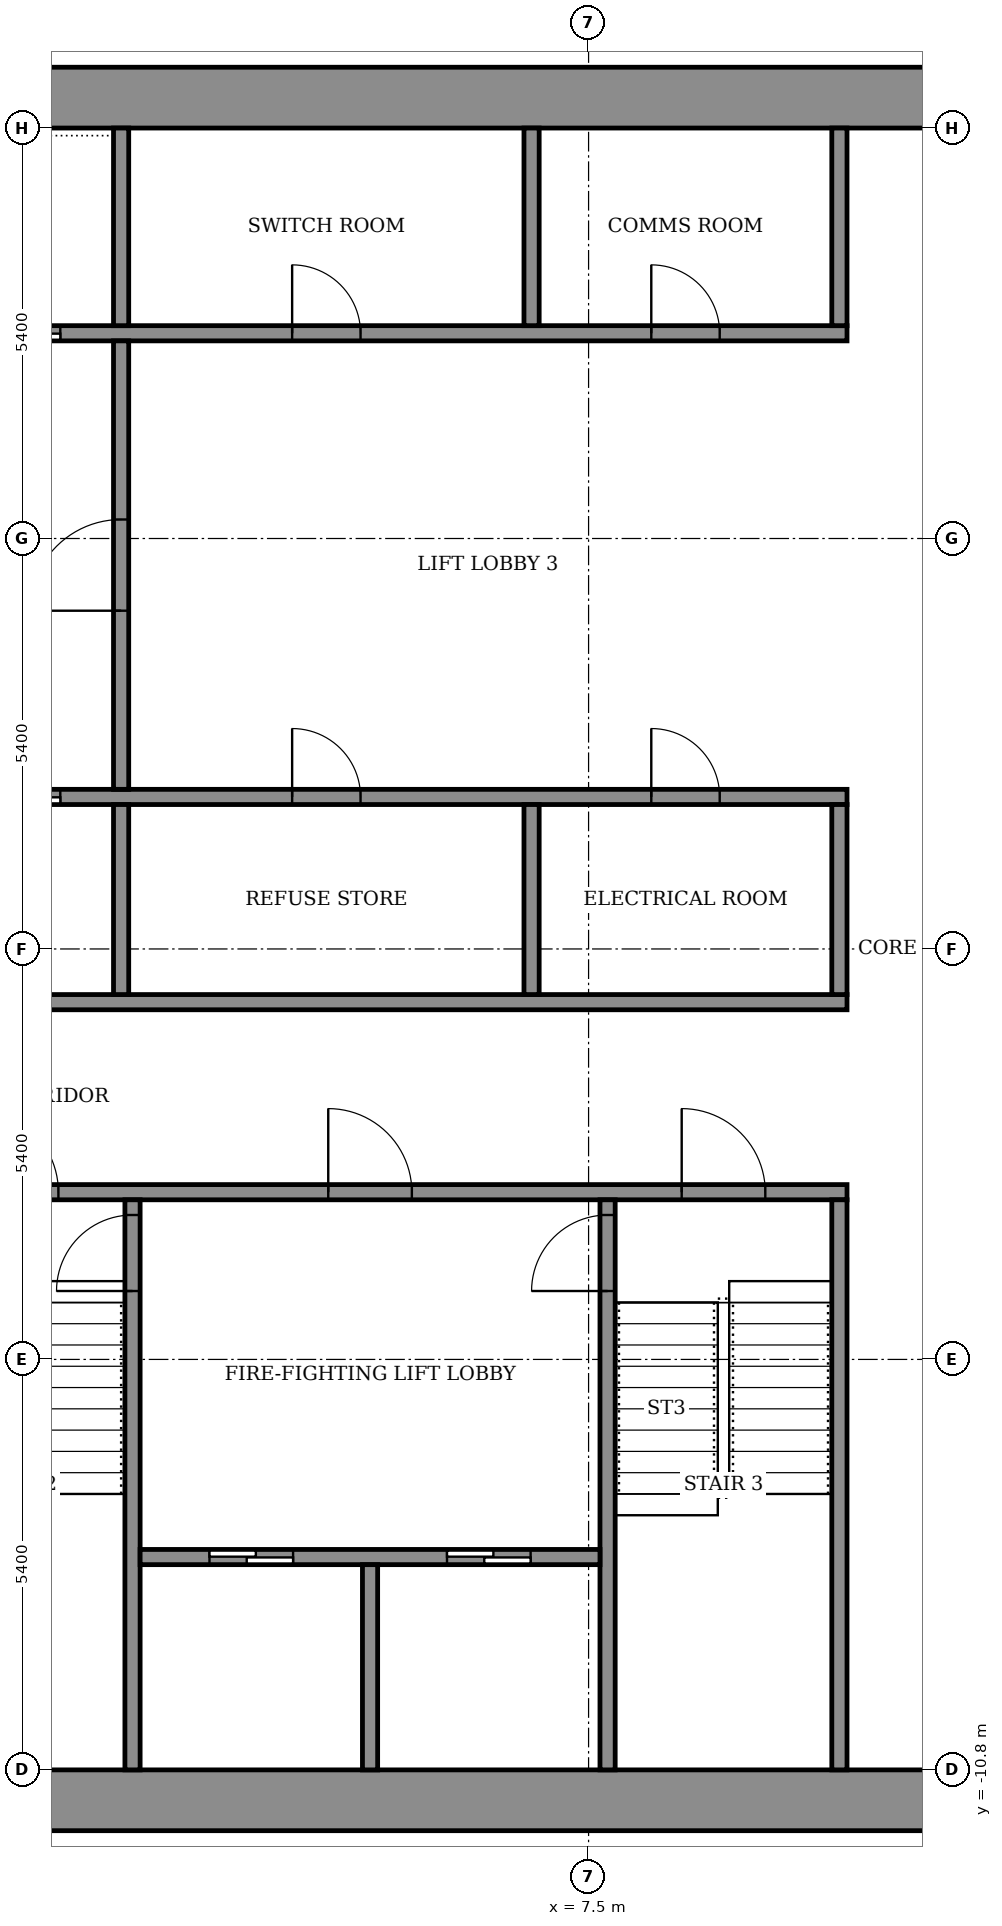
"""IFC4 building model, lengths in metres.
Left out: names, types, materials, properties, quantities, classifications, styles, units other than length and angle.
Written with IfcOpenShell. Run it as: python <this file> out.ifc"""

import sys

from ifc_helpers import new_model, si_unit, direction, frame, frame_2d, origin, place, context, subcontext, project, spatial, rectangle, extrude, element, fill, save


model = new_model("IFC4")
c1 = context("Model", 3, precision=1e-05, world=origin(), true_north=direction((0.0, 1.0)))
c2 = subcontext(c1, "Body", "Model", "MODEL_VIEW")
j1 = project(units=[si_unit("LENGTHUNIT", "METRE"), si_unit("PLANEANGLEUNIT", "RADIAN")], contexts=[c1])
p1 = place(None, origin())
s1 = spatial("IfcSite", under=j1, at=p1, CompositionType="ELEMENT")
p2 = place(p1, origin())
s2 = spatial("IfcBuilding", under=s1, at=p2, CompositionType="ELEMENT")
p3 = place(p2, frame((0.0, 0.0, 245.5)))
s3 = spatial("IfcBuildingStorey", under=s2, at=p3, CompositionType="ELEMENT", Elevation=245.5)
for number, where, z_axis, x_axis in (
    (1, (-14.6, -11.2, 0.0), (0.0, 0.0, 1.0), (1.0, 0.0, 0.0)),
    (2, (-14.6, 11.2, 0.0), (0.0, 0.0, 1.0), (1.0, 0.0, 0.0)),
):
    element("IfcWall", number, at=place(p3, frame(where, z_axis=z_axis, x_axis=x_axis)), inside=s3, PredefinedType="SHEAR", context=c2, shape_type="SweptSolid", body=[
        extrude(rectangle(XDim=29.2, YDim=0.8, at=frame_2d((14.6, 0.0))), origin(), (0.0, 0.0, 1.0), 3.6),
    ])
p4 = place(p3, frame((-10.9, -3.2, 0.0), z_axis=(0.0, 0.0, 1.0), x_axis=(1.0, 0.0, 0.0)))
e3 = element("IfcWall", 3, at=p4, inside=s3, PredefinedType="SHEAR", context=c2, shape_type="SweptSolid", body=[
    extrude(rectangle(XDim=21.8, YDim=0.2, at=frame_2d((10.9, 0.0))), origin(), (0.0, 0.0, 1.0), 3.05),
])
p5 = place(p4, frame((1.075, 0.0, 0.0)))
e4 = element("IfcOpeningElement", 4, at=p5, cuts=e3, PredefinedType="OPENING", context=c2, shape_type="SweptSolid", body=[
    extrude(rectangle(XDim=1.1, YDim=2.1, at=frame_2d((0.55, 1.05))), frame((0.0, 0.11, 0.0), z_axis=(0.0, -1.0, 0.0), x_axis=(1.0, 0.0, 0.0)), (0.0, 0.0, 1.0), 0.22),
])
p6 = place(p4, frame((10.325, 0.0, 0.0)))
e5 = element("IfcOpeningElement", 5, at=p6, cuts=e3, PredefinedType="OPENING", context=c2, shape_type="SweptSolid", body=[
    extrude(rectangle(XDim=1.1, YDim=2.1, at=frame_2d((0.55, 1.05))), frame((0.0, 0.11, 0.0), z_axis=(0.0, -1.0, 0.0), x_axis=(1.0, 0.0, 0.0)), (0.0, 0.0, 1.0), 0.22),
])
p7 = place(p4, frame((19.625, 0.0, 0.0)))
e6 = element("IfcOpeningElement", 6, at=p7, cuts=e3, PredefinedType="OPENING", context=c2, shape_type="SweptSolid", body=[
    extrude(rectangle(XDim=1.1, YDim=2.1, at=frame_2d((0.55, 1.05))), frame((0.0, 0.11, 0.0), z_axis=(0.0, -1.0, 0.0), x_axis=(1.0, 0.0, 0.0)), (0.0, 0.0, 1.0), 0.22),
])
p8 = place(p4, frame((5.7, 0.0, 0.0)))
e7 = element("IfcOpeningElement", 7, at=p8, cuts=e3, PredefinedType="OPENING", context=c2, shape_type="SweptSolid", body=[
    extrude(rectangle(XDim=1.1, YDim=2.1, at=frame_2d((0.55, 1.05))), frame((0.0, 0.11, 0.0), z_axis=(0.0, -1.0, 0.0), x_axis=(1.0, 0.0, 0.0)), (0.0, 0.0, 1.0), 0.22),
])
p9 = place(p4, frame((14.975, 0.0, 0.0)))
e8 = element("IfcOpeningElement", 8, at=p9, cuts=e3, PredefinedType="OPENING", context=c2, shape_type="SweptSolid", body=[
    extrude(rectangle(XDim=1.1, YDim=2.1, at=frame_2d((0.55, 1.05))), frame((0.0, 0.11, 0.0), z_axis=(0.0, -1.0, 0.0), x_axis=(1.0, 0.0, 0.0)), (0.0, 0.0, 1.0), 0.22),
])
p10 = place(p3, frame((-10.9, -0.7, 0.0), z_axis=(0.0, 0.0, 1.0), x_axis=(1.0, 0.0, 0.0)))
e9 = element("IfcWall", 9, at=p10, inside=s3, PredefinedType="SHEAR", context=c2, shape_type="SweptSolid", body=[
    extrude(rectangle(XDim=21.8, YDim=0.2, at=frame_2d((10.9, 0.0))), origin(), (0.0, 0.0, 1.0), 3.05),
])
p11 = place(p3, frame((-10.9, 2.0, 0.0), z_axis=(0.0, 0.0, 1.0), x_axis=(1.0, 0.0, 0.0)))
e10 = element("IfcWall", 10, at=p11, inside=s3, PredefinedType="SHEAR", context=c2, shape_type="SweptSolid", body=[
    extrude(rectangle(XDim=21.8, YDim=0.2, at=frame_2d((10.9, 0.0))), origin(), (0.0, 0.0, 1.0), 3.05),
])
p12 = place(p11, frame((4.95, 0.0, 0.0)))
e11 = element("IfcOpeningElement", 11, at=p12, cuts=e10, PredefinedType="OPENING", context=c2, shape_type="SweptSolid", body=[
    extrude(rectangle(XDim=1.1, YDim=2.1, at=frame_2d((0.55, 1.05))), frame((0.0, 0.11, 0.0), z_axis=(0.0, -1.0, 0.0), x_axis=(1.0, 0.0, 0.0)), (0.0, 0.0, 1.0), 0.22),
])
p13 = place(p11, frame((7.65, 0.0, 0.0)))
e12 = element("IfcOpeningElement", 12, at=p13, cuts=e10, PredefinedType="OPENING", context=c2, shape_type="SweptSolid", body=[
    extrude(rectangle(XDim=1.1, YDim=2.1, at=frame_2d((0.55, 1.05))), frame((0.0, 0.11, 0.0), z_axis=(0.0, -1.0, 0.0), x_axis=(1.0, 0.0, 0.0)), (0.0, 0.0, 1.0), 0.22),
])
p14 = place(p11, frame((10.35, 0.0, 0.0)))
e13 = element("IfcOpeningElement", 13, at=p14, cuts=e10, PredefinedType="OPENING", context=c2, shape_type="SweptSolid", body=[
    extrude(rectangle(XDim=1.1, YDim=2.1, at=frame_2d((0.55, 1.05))), frame((0.0, 0.11, 0.0), z_axis=(0.0, -1.0, 0.0), x_axis=(1.0, 0.0, 0.0)), (0.0, 0.0, 1.0), 0.22),
])
p15 = place(p11, frame((1.675, 0.0, 0.0)))
e14 = element("IfcOpeningElement", 14, at=p15, cuts=e10, PredefinedType="OPENING", context=c2, shape_type="SweptSolid", body=[
    extrude(rectangle(XDim=0.9, YDim=2.1, at=frame_2d((0.45, 1.05))), frame((0.0, 0.11, 0.0), z_axis=(0.0, -1.0, 0.0), x_axis=(1.0, 0.0, 0.0)), (0.0, 0.0, 1.0), 0.22),
])
p16 = place(p11, frame((14.5, 0.0, 0.0)))
e15 = element("IfcOpeningElement", 15, at=p16, cuts=e10, PredefinedType="OPENING", context=c2, shape_type="SweptSolid", body=[
    extrude(rectangle(XDim=0.9, YDim=2.1, at=frame_2d((0.45, 1.05))), frame((0.0, 0.11, 0.0), z_axis=(0.0, -1.0, 0.0), x_axis=(1.0, 0.0, 0.0)), (0.0, 0.0, 1.0), 0.22),
])
p17 = place(p11, frame((19.225, 0.0, 0.0)))
e16 = element("IfcOpeningElement", 16, at=p17, cuts=e10, PredefinedType="OPENING", context=c2, shape_type="SweptSolid", body=[
    extrude(rectangle(XDim=0.9, YDim=2.1, at=frame_2d((0.45, 1.05))), frame((0.0, 0.11, 0.0), z_axis=(0.0, -1.0, 0.0), x_axis=(1.0, 0.0, 0.0)), (0.0, 0.0, 1.0), 0.22),
])
p18 = place(p3, frame((-10.9, 8.1, 0.0), z_axis=(0.0, 0.0, 1.0), x_axis=(1.0, 0.0, 0.0)))
e17 = element("IfcWall", 17, at=p18, inside=s3, PredefinedType="SHEAR", context=c2, shape_type="SweptSolid", body=[
    extrude(rectangle(XDim=21.8, YDim=0.2, at=frame_2d((10.9, 0.0))), origin(), (0.0, 0.0, 1.0), 3.05),
])
p19 = place(p18, frame((4.95, 0.0, 0.0)))
e18 = element("IfcOpeningElement", 18, at=p19, cuts=e17, PredefinedType="OPENING", context=c2, shape_type="SweptSolid", body=[
    extrude(rectangle(XDim=1.1, YDim=2.1, at=frame_2d((0.55, 1.05))), frame((0.0, 0.11, 0.0), z_axis=(0.0, -1.0, 0.0), x_axis=(1.0, 0.0, 0.0)), (0.0, 0.0, 1.0), 0.22),
])
p20 = place(p18, frame((7.65, 0.0, 0.0)))
e19 = element("IfcOpeningElement", 19, at=p20, cuts=e17, PredefinedType="OPENING", context=c2, shape_type="SweptSolid", body=[
    extrude(rectangle(XDim=1.1, YDim=2.1, at=frame_2d((0.55, 1.05))), frame((0.0, 0.11, 0.0), z_axis=(0.0, -1.0, 0.0), x_axis=(1.0, 0.0, 0.0)), (0.0, 0.0, 1.0), 0.22),
])
p21 = place(p18, frame((10.35, 0.0, 0.0)))
e20 = element("IfcOpeningElement", 20, at=p21, cuts=e17, PredefinedType="OPENING", context=c2, shape_type="SweptSolid", body=[
    extrude(rectangle(XDim=1.1, YDim=2.1, at=frame_2d((0.55, 1.05))), frame((0.0, 0.11, 0.0), z_axis=(0.0, -1.0, 0.0), x_axis=(1.0, 0.0, 0.0)), (0.0, 0.0, 1.0), 0.22),
])
p22 = place(p18, frame((1.675, 0.0, 0.0)))
e21 = element("IfcOpeningElement", 21, at=p22, cuts=e17, PredefinedType="OPENING", context=c2, shape_type="SweptSolid", body=[
    extrude(rectangle(XDim=0.9, YDim=2.1, at=frame_2d((0.45, 1.05))), frame((0.0, 0.11, 0.0), z_axis=(0.0, -1.0, 0.0), x_axis=(1.0, 0.0, 0.0)), (0.0, 0.0, 1.0), 0.22),
])
p23 = place(p18, frame((14.5, 0.0, 0.0)))
e22 = element("IfcOpeningElement", 22, at=p23, cuts=e17, PredefinedType="OPENING", context=c2, shape_type="SweptSolid", body=[
    extrude(rectangle(XDim=0.9, YDim=2.1, at=frame_2d((0.45, 1.05))), frame((0.0, 0.11, 0.0), z_axis=(0.0, -1.0, 0.0), x_axis=(1.0, 0.0, 0.0)), (0.0, 0.0, 1.0), 0.22),
])
p24 = place(p18, frame((19.225, 0.0, 0.0)))
e23 = element("IfcOpeningElement", 23, at=p24, cuts=e17, PredefinedType="OPENING", context=c2, shape_type="SweptSolid", body=[
    extrude(rectangle(XDim=0.9, YDim=2.1, at=frame_2d((0.45, 1.05))), frame((0.0, 0.11, 0.0), z_axis=(0.0, -1.0, 0.0), x_axis=(1.0, 0.0, 0.0)), (0.0, 0.0, 1.0), 0.22),
])
p25 = place(p3, frame((1.5, -10.8, 0.0), z_axis=(0.0, 0.0, 1.0), x_axis=(0.0, 1.0, 0.0)))
e24 = element("IfcWall", 24, at=p25, inside=s3, PredefinedType="SHEAR", context=c2, shape_type="SweptSolid", body=[
    extrude(rectangle(XDim=7.5, YDim=0.2, at=frame_2d((3.75, 0.0))), origin(), (0.0, 0.0, 1.0), 3.05),
])
p26 = place(p25, frame((6.3, 0.0, 0.0)))
e25 = element("IfcOpeningElement", 25, at=p26, cuts=e24, PredefinedType="OPENING", context=c2, shape_type="SweptSolid", body=[
    extrude(rectangle(XDim=1.0, YDim=2.1, at=frame_2d((0.5, 1.05))), frame((0.0, 0.11, 0.0), z_axis=(0.0, -1.0, 0.0), x_axis=(1.0, 0.0, 0.0)), (0.0, 0.0, 1.0), 0.22),
])
p27 = place(p3, frame((7.75, -10.8, 0.0), z_axis=(0.0, 0.0, 1.0), x_axis=(0.0, 1.0, 0.0)))
e26 = element("IfcWall", 26, at=p27, inside=s3, PredefinedType="SHEAR", context=c2, shape_type="SweptSolid", body=[
    extrude(rectangle(XDim=7.5, YDim=0.2, at=frame_2d((3.75, 0.0))), origin(), (0.0, 0.0, 1.0), 3.05),
])
p28 = place(p27, frame((6.3, 0.0, 0.0)))
e27 = element("IfcOpeningElement", 27, at=p28, cuts=e26, PredefinedType="OPENING", context=c2, shape_type="SweptSolid", body=[
    extrude(rectangle(XDim=1.0, YDim=2.1, at=frame_2d((0.5, 1.05))), frame((0.0, 0.11, 0.0), z_axis=(0.0, -1.0, 0.0), x_axis=(1.0, 0.0, 0.0)), (0.0, 0.0, 1.0), 0.22),
])
p29 = place(p3, frame((10.8, -10.8, 0.0), z_axis=(0.0, 0.0, 1.0), x_axis=(0.0, 1.0, 0.0)))
e28 = element("IfcWall", 28, at=p29, inside=s3, PredefinedType="SHEAR", context=c2, shape_type="SweptSolid", body=[
    extrude(rectangle(XDim=7.5, YDim=0.2, at=frame_2d((3.75, 0.0))), origin(), (0.0, 0.0, 1.0), 3.05),
])
p30 = place(p3, frame((1.6, -8.0, 0.0), z_axis=(0.0, 0.0, 1.0), x_axis=(1.0, 0.0, 0.0)))
e29 = element("IfcWall", 29, at=p30, inside=s3, PredefinedType="SHEAR", context=c2, shape_type="SweptSolid", body=[
    extrude(rectangle(XDim=6.05, YDim=0.2, at=frame_2d((3.025, 0.0))), origin(), (0.0, 0.0, 1.0), 3.05),
])
p31 = place(p30, frame((0.913, 0.0, 0.0)))
e30 = element("IfcOpeningElement", 30, at=p31, cuts=e29, PredefinedType="OPENING", context=c2, shape_type="SweptSolid", body=[
    extrude(rectangle(XDim=1.1, YDim=2.1, at=frame_2d((0.55, 1.05))), frame((0.0, 0.11, 0.0), z_axis=(0.0, -1.0, 0.0), x_axis=(1.0, 0.0, 0.0)), (0.0, 0.0, 1.0), 0.22),
])
p32 = place(p30, frame((4.038, 0.0, 0.0)))
e31 = element("IfcOpeningElement", 31, at=p32, cuts=e29, PredefinedType="OPENING", context=c2, shape_type="SweptSolid", body=[
    extrude(rectangle(XDim=1.1, YDim=2.1, at=frame_2d((0.55, 1.05))), frame((0.0, 0.11, 0.0), z_axis=(0.0, -1.0, 0.0), x_axis=(1.0, 0.0, 0.0)), (0.0, 0.0, 1.0), 0.22),
])
p33 = place(p3, frame((4.625, -10.8, 0.0), z_axis=(0.0, 0.0, 1.0), x_axis=(0.0, 1.0, 0.0)))
e32 = element("IfcWall", 32, at=p33, inside=s3, PredefinedType="SHEAR", context=c2, shape_type="SweptSolid", body=[
    extrude(rectangle(XDim=2.7, YDim=0.2, at=frame_2d((1.35, 0.0))), origin(), (0.0, 0.0, 1.0), 3.05),
])
p34 = place(p3, frame((1.35, -0.6, 0.0), z_axis=(0.0, 0.0, 1.0), x_axis=(0.0, 1.0, 0.0)))
e33 = element("IfcWall", 33, at=p34, inside=s3, PredefinedType="SHEAR", context=c2, shape_type="SweptSolid", body=[
    extrude(rectangle(XDim=2.5, YDim=0.2, at=frame_2d((1.25, 0.0))), origin(), (0.0, 0.0, 1.0), 3.05),
])
for number, where, z_axis, x_axis in (
    (34, (6.75, -0.6, 0.0), (0.0, 0.0, 1.0), (0.0, 1.0, 0.0)),
    (35, (10.8, -0.6, 0.0), (0.0, 0.0, 1.0), (0.0, 1.0, 0.0)),
):
    element("IfcWall", number, at=place(p3, frame(where, z_axis=z_axis, x_axis=x_axis)), inside=s3, PredefinedType="STANDARD", context=c2, shape_type="SweptSolid", body=[
        extrude(rectangle(XDim=2.5, YDim=0.2, at=frame_2d((1.25, 0.0))), origin(), (0.0, 0.0, 1.0), 3.05),
    ])
p35 = place(p3, frame((1.35, 8.2, 0.0), z_axis=(0.0, 0.0, 1.0), x_axis=(0.0, 1.0, 0.0)))
e36 = element("IfcWall", 36, at=p35, inside=s3, PredefinedType="SHEAR", context=c2, shape_type="SweptSolid", body=[
    extrude(rectangle(XDim=2.6, YDim=0.2, at=frame_2d((1.3, 0.0))), origin(), (0.0, 0.0, 1.0), 3.05),
])
for number, where, z_axis, x_axis in (
    (37, (6.75, 8.2, 0.0), (0.0, 0.0, 1.0), (0.0, 1.0, 0.0)),
    (38, (10.8, 8.2, 0.0), (0.0, 0.0, 1.0), (0.0, 1.0, 0.0)),
):
    element("IfcWall", number, at=place(p3, frame(where, z_axis=z_axis, x_axis=x_axis)), inside=s3, PredefinedType="STANDARD", context=c2, shape_type="SweptSolid", body=[
        extrude(rectangle(XDim=2.6, YDim=0.2, at=frame_2d((1.3, 0.0))), origin(), (0.0, 0.0, 1.0), 3.05),
    ])
p36 = place(p3, frame((1.35, 2.1, 0.0), z_axis=(0.0, 0.0, 1.0), x_axis=(0.0, 1.0, 0.0)))
e39 = element("IfcWall", 39, at=p36, inside=s3, PredefinedType="STANDARD", context=c2, shape_type="SweptSolid", body=[
    extrude(rectangle(XDim=5.9, YDim=0.2, at=frame_2d((2.95, 0.0))), origin(), (0.0, 0.0, 1.0), 3.05),
])
p37 = place(p36, frame((2.35, 0.0, 0.0)))
e40 = element("IfcOpeningElement", 40, at=p37, cuts=e39, PredefinedType="OPENING", context=c2, shape_type="SweptSolid", body=[
    extrude(rectangle(XDim=1.2, YDim=2.1, at=frame_2d((0.6, 1.05))), frame((0.0, 0.11, 0.0), z_axis=(0.0, -1.0, 0.0), x_axis=(1.0, 0.0, 0.0)), (0.0, 0.0, 1.0), 0.22),
])
p38 = place(p14, origin())
e41 = element("IfcDoor", 41, at=p38, inside=s3, OperationType="SLIDING_TO_LEFT", PredefinedType="DOOR", context=c2, shape_type="SweptSolid", body=[
    extrude(rectangle(XDim=1.1, YDim=2.1, at=frame_2d((0.55, 1.05))), frame((0.0, 0.025, 0.0), z_axis=(0.0, -1.0, 0.0), x_axis=(1.0, 0.0, 0.0)), (0.0, 0.0, 1.0), 0.05),
])
fill(e13, e41)
p39 = place(p21, origin())
e42 = element("IfcDoor", 42, at=p39, inside=s3, OperationType="SLIDING_TO_LEFT", PredefinedType="DOOR", context=c2, shape_type="SweptSolid", body=[
    extrude(rectangle(XDim=1.1, YDim=2.1, at=frame_2d((0.55, 1.05))), frame((0.0, 0.025, 0.0), z_axis=(0.0, -1.0, 0.0), x_axis=(1.0, 0.0, 0.0)), (0.0, 0.0, 1.0), 0.05),
])
fill(e20, e42)
p40 = place(p16, origin())
e43 = element("IfcDoor", 43, at=p40, inside=s3, OperationType="SINGLE_SWING_RIGHT", PredefinedType="DOOR", context=c2, shape_type="SweptSolid", body=[
    extrude(rectangle(XDim=0.9, YDim=2.1, at=frame_2d((0.45, 1.05))), frame((0.0, 0.025, 0.0), z_axis=(0.0, -1.0, 0.0), x_axis=(1.0, 0.0, 0.0)), (0.0, 0.0, 1.0), 0.05),
])
fill(e15, e43)
p41 = place(p17, origin())
e44 = element("IfcDoor", 44, at=p41, inside=s3, OperationType="SINGLE_SWING_LEFT", PredefinedType="DOOR", context=c2, shape_type="SweptSolid", body=[
    extrude(rectangle(XDim=0.9, YDim=2.1, at=frame_2d((0.45, 1.05))), frame((0.0, 0.025, 0.0), z_axis=(0.0, -1.0, 0.0), x_axis=(1.0, 0.0, 0.0)), (0.0, 0.0, 1.0), 0.05),
])
fill(e16, e44)
p42 = place(p23, origin())
e45 = element("IfcDoor", 45, at=p42, inside=s3, OperationType="SINGLE_SWING_LEFT", PredefinedType="DOOR", context=c2, shape_type="SweptSolid", body=[
    extrude(rectangle(XDim=0.9, YDim=2.1, at=frame_2d((0.45, 1.05))), frame((0.0, 0.025, 0.0), z_axis=(0.0, -1.0, 0.0), x_axis=(1.0, 0.0, 0.0)), (0.0, 0.0, 1.0), 0.05),
])
fill(e22, e45)
p43 = place(p24, origin())
e46 = element("IfcDoor", 46, at=p43, inside=s3, OperationType="SINGLE_SWING_LEFT", PredefinedType="DOOR", context=c2, shape_type="SweptSolid", body=[
    extrude(rectangle(XDim=0.9, YDim=2.1, at=frame_2d((0.45, 1.05))), frame((0.0, 0.025, 0.0), z_axis=(0.0, -1.0, 0.0), x_axis=(1.0, 0.0, 0.0)), (0.0, 0.0, 1.0), 0.05),
])
fill(e23, e46)
p44 = place(p31, origin())
e47 = element("IfcDoor", 47, at=p44, inside=s3, OperationType="SLIDING_TO_LEFT", PredefinedType="DOOR", context=c2, shape_type="SweptSolid", body=[
    extrude(rectangle(XDim=1.1, YDim=2.1, at=frame_2d((0.55, 1.05))), frame((0.0, 0.025, 0.0), z_axis=(0.0, -1.0, 0.0), x_axis=(1.0, 0.0, 0.0)), (0.0, 0.0, 1.0), 0.05),
])
fill(e30, e47)
p45 = place(p32, origin())
e48 = element("IfcDoor", 48, at=p45, inside=s3, OperationType="SLIDING_TO_LEFT", PredefinedType="DOOR", context=c2, shape_type="SweptSolid", body=[
    extrude(rectangle(XDim=1.1, YDim=2.1, at=frame_2d((0.55, 1.05))), frame((0.0, 0.025, 0.0), z_axis=(0.0, -1.0, 0.0), x_axis=(1.0, 0.0, 0.0)), (0.0, 0.0, 1.0), 0.05),
])
fill(e31, e48)
p46 = place(p6, origin())
e49 = element("IfcDoor", 49, at=p46, inside=s3, OperationType="SINGLE_SWING_RIGHT", PredefinedType="DOOR", context=c2, shape_type="SweptSolid", body=[
    extrude(rectangle(XDim=1.1, YDim=2.1, at=frame_2d((0.55, 1.05))), frame((0.0, 0.025, 0.0), z_axis=(0.0, -1.0, 0.0), x_axis=(1.0, 0.0, 0.0)), (0.0, 0.0, 1.0), 0.05),
])
fill(e5, e49)
p47 = place(p7, origin())
e50 = element("IfcDoor", 50, at=p47, inside=s3, OperationType="SINGLE_SWING_RIGHT", PredefinedType="DOOR", context=c2, shape_type="SweptSolid", body=[
    extrude(rectangle(XDim=1.1, YDim=2.1, at=frame_2d((0.55, 1.05))), frame((0.0, 0.025, 0.0), z_axis=(0.0, -1.0, 0.0), x_axis=(1.0, 0.0, 0.0)), (0.0, 0.0, 1.0), 0.05),
])
fill(e6, e50)
p48 = place(p9, origin())
e51 = element("IfcDoor", 51, at=p48, inside=s3, OperationType="SINGLE_SWING_LEFT", PredefinedType="DOOR", context=c2, shape_type="SweptSolid", body=[
    extrude(rectangle(XDim=1.1, YDim=2.1, at=frame_2d((0.55, 1.05))), frame((0.0, 0.025, 0.0), z_axis=(0.0, -1.0, 0.0), x_axis=(1.0, 0.0, 0.0)), (0.0, 0.0, 1.0), 0.05),
])
fill(e8, e51)
p49 = place(p26, origin())
e52 = element("IfcDoor", 52, at=p49, inside=s3, OperationType="SINGLE_SWING_RIGHT", PredefinedType="DOOR", context=c2, shape_type="SweptSolid", body=[
    extrude(rectangle(XDim=1.0, YDim=2.1, at=frame_2d((0.5, 1.05))), frame((0.0, 0.025, 0.0), z_axis=(0.0, -1.0, 0.0), x_axis=(1.0, 0.0, 0.0)), (0.0, 0.0, 1.0), 0.05),
])
fill(e25, e52)
p50 = place(p28, origin())
e53 = element("IfcDoor", 53, at=p50, inside=s3, OperationType="SINGLE_SWING_RIGHT", PredefinedType="DOOR", context=c2, shape_type="SweptSolid", body=[
    extrude(rectangle(XDim=1.0, YDim=2.1, at=frame_2d((0.5, 1.05))), frame((0.0, 0.025, 0.0), z_axis=(0.0, -1.0, 0.0), x_axis=(1.0, 0.0, 0.0)), (0.0, 0.0, 1.0), 0.05),
])
fill(e27, e53)
p51 = place(p37, origin())
e54 = element("IfcDoor", 54, at=p51, inside=s3, OperationType="SINGLE_SWING_LEFT", PredefinedType="DOOR", context=c2, shape_type="SweptSolid", body=[
    extrude(rectangle(XDim=1.2, YDim=2.1, at=frame_2d((0.6, 1.05))), frame((0.0, 0.025, 0.0), z_axis=(0.0, -1.0, 0.0), x_axis=(1.0, 0.0, 0.0)), (0.0, 0.0, 1.0), 0.05),
])
fill(e40, e54)
save(model, sys.argv[1])
